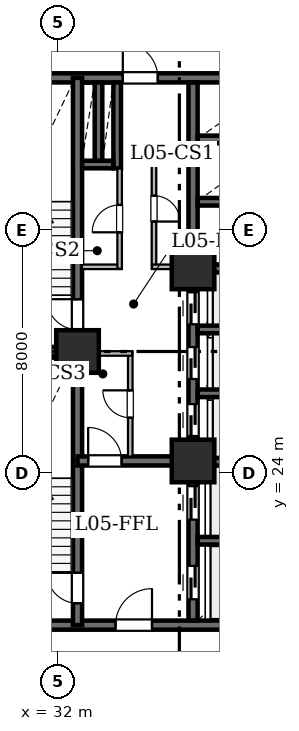
"""IFC4 building model, lengths in metres.
Left out: names, types, materials, properties, quantities, classifications, styles, units other than length and angle.
Written with IfcOpenShell. Run it as: python <this file> out.ifc"""

import sys

from ifc_helpers import new_model, si_unit, direction, frame, frame_2d, origin, origin_2d, place, context, subcontext, project, spatial, rectangle, hollow_rectangle, extrude, element, fill, save


model = new_model("IFC4")
c1 = context("Model", 3, precision=1e-05, world=origin(), true_north=direction((0.0, 1.0)))
c2 = subcontext(c1, "Body", "Model", "MODEL_VIEW")
j1 = project(units=[si_unit("LENGTHUNIT", "METRE"), si_unit("PLANEANGLEUNIT", "RADIAN")], contexts=[c1])
p1 = place(None, origin())
s1 = spatial("IfcSite", under=j1, at=p1, CompositionType="ELEMENT")
p2 = place(p1, origin())
s2 = spatial("IfcBuilding", under=s1, at=p2, CompositionType="ELEMENT")
p3 = place(p2, frame((0.0, 0.0, 24.6)))
s3 = spatial("IfcBuildingStorey", under=s2, at=p3, CompositionType="ELEMENT", Elevation=24.6)
for number, where, z_axis, x_axis in (
    (1, (32.65, 28.0, 0.0), (0.0, 0.0, 1.0), (1.0, 0.0, 0.0)),
    (2, (36.45, 24.4, 0.0), (0.0, 0.0, 1.0), (1.0, 0.0, 0.0)),
    (3, (36.45, 30.75, 0.0), (0.0, 0.0, 1.0), (1.0, 0.0, 0.0)),
):
    element("IfcColumn", number, at=place(p3, frame(where, z_axis=z_axis, x_axis=x_axis)), inside=s3, PredefinedType="COLUMN", context=c2, shape_type="SweptSolid", body=[
        extrude(hollow_rectangle(XDim=1.4, YDim=1.4, WallThickness=0.07, at=origin_2d()), origin(), (0.0, 0.0, 1.0), 4.2),
    ])
p4 = place(p3, frame((29.0, 19.0, 0.0), z_axis=(0.0, 0.0, 1.0), x_axis=(1.0, 0.0, 0.0)))
e4 = element("IfcWall", 4, at=p4, inside=s3, PredefinedType="SHEAR", context=c2, shape_type="SweptSolid", body=[
    extrude(rectangle(XDim=10.4, YDim=0.3, at=frame_2d((5.2, 0.0))), origin(), (0.0, 0.0, 1.0), 3.92),
])
p5 = place(p4, frame((4.9, 0.0, 0.0)))
e5 = element("IfcOpeningElement", 5, at=p5, cuts=e4, PredefinedType="OPENING", context=c2, shape_type="SweptSolid", body=[
    extrude(rectangle(XDim=1.2, YDim=2.15, at=frame_2d((0.6, 1.075))), frame((0.0, 0.16, 0.0), z_axis=(0.0, -1.0, 0.0), x_axis=(1.0, 0.0, 0.0)), (0.0, 0.0, 1.0), 0.32),
])
p6 = place(p3, frame((29.0, 37.0, 0.0), z_axis=(0.0, 0.0, 1.0), x_axis=(1.0, 0.0, 0.0)))
e6 = element("IfcWall", 6, at=p6, inside=s3, PredefinedType="SHEAR", context=c2, shape_type="SweptSolid", body=[
    extrude(rectangle(XDim=10.4, YDim=0.3, at=frame_2d((5.2, 0.0))), origin(), (0.0, 0.0, 1.0), 3.92),
])
p7 = place(p6, frame((5.14, 0.0, 0.0)))
e7 = element("IfcOpeningElement", 7, at=p7, cuts=e6, PredefinedType="OPENING", context=c2, shape_type="SweptSolid", body=[
    extrude(rectangle(XDim=1.15, YDim=2.2, at=frame_2d((0.575, 1.1))), frame((0.0, 0.16, 0.0), z_axis=(0.0, -1.0, 0.0), x_axis=(1.0, 0.0, 0.0)), (0.0, 0.0, 1.0), 0.32),
])
p8 = place(p3, frame((32.65, 19.0, 0.0), z_axis=(0.0, 0.0, 1.0), x_axis=(0.0, 1.0, 0.0)))
e8 = element("IfcWall", 8, at=p8, inside=s3, PredefinedType="SHEAR", context=c2, shape_type="SweptSolid", body=[
    extrude(rectangle(XDim=9.0, YDim=0.3, at=frame_2d((4.5, 0.0))), origin(), (0.0, 0.0, 1.0), 3.92),
])
p9 = place(p8, frame((0.72, 0.0, 0.0)))
e9 = element("IfcOpeningElement", 9, at=p9, cuts=e8, PredefinedType="OPENING", context=c2, shape_type="SweptSolid", body=[
    extrude(rectangle(XDim=1.0, YDim=2.15, at=frame_2d((0.5, 1.075))), frame((0.0, 0.16, 0.0), z_axis=(0.0, -1.0, 0.0), x_axis=(1.0, 0.0, 0.0)), (0.0, 0.0, 1.0), 0.32),
])
p10 = place(p3, frame((32.65, 28.0, 0.0), z_axis=(0.0, 0.0, 1.0), x_axis=(0.0, 1.0, 0.0)))
e10 = element("IfcWall", 10, at=p10, inside=s3, PredefinedType="SHEAR", context=c2, shape_type="SweptSolid", body=[
    extrude(rectangle(XDim=9.0, YDim=0.3, at=frame_2d((4.5, 0.0))), origin(), (0.0, 0.0, 1.0), 3.92),
])
p11 = place(p10, frame((0.72, 0.0, 0.0)))
e11 = element("IfcOpeningElement", 11, at=p11, cuts=e10, PredefinedType="OPENING", context=c2, shape_type="SweptSolid", body=[
    extrude(rectangle(XDim=1.0, YDim=2.15, at=frame_2d((0.5, 1.075))), frame((0.0, 0.16, 0.0), z_axis=(0.0, -1.0, 0.0), x_axis=(1.0, 0.0, 0.0)), (0.0, 0.0, 1.0), 0.32),
])
p12 = place(p3, frame((29.0, 28.0, 0.0), z_axis=(0.0, 0.0, 1.0), x_axis=(1.0, 0.0, 0.0)))
e12 = element("IfcWall", 12, at=p12, inside=s3, PredefinedType="SHEAR", context=c2, shape_type="SweptSolid", body=[
    extrude(rectangle(XDim=3.65, YDim=0.3, at=frame_2d((1.825, 0.0))), origin(), (0.0, 0.0, 1.0), 3.92),
])
p13 = place(p3, frame((32.65, 24.4, 0.0), z_axis=(0.0, 0.0, 1.0), x_axis=(1.0, 0.0, 0.0)))
e13 = element("IfcWall", 13, at=p13, inside=s3, PredefinedType="SHEAR", context=c2, shape_type="SweptSolid", body=[
    extrude(rectangle(XDim=3.8, YDim=0.3, at=frame_2d((1.9, 0.0))), origin(), (0.0, 0.0, 1.0), 3.92),
])
p14 = place(p13, frame((0.35, 0.0, 0.0)))
e14 = element("IfcOpeningElement", 14, at=p14, cuts=e13, PredefinedType="OPENING", context=c2, shape_type="SweptSolid", body=[
    extrude(rectangle(XDim=1.1, YDim=2.15, at=frame_2d((0.55, 1.075))), frame((0.0, 0.16, 0.0), z_axis=(0.0, -1.0, 0.0), x_axis=(1.0, 0.0, 0.0)), (0.0, 0.0, 1.0), 0.32),
])
p15 = place(p3, frame((36.45, 19.154, 0.0), z_axis=(0.0, 0.0, 1.0), x_axis=(0.0, 1.0, 0.0)))
e15 = element("IfcWall", 15, at=p15, inside=s3, PredefinedType="SHEAR", context=c2, shape_type="SweptSolid", body=[
    extrude(rectangle(XDim=4.546, YDim=0.3, at=frame_2d((2.273, 0.0))), origin(), (0.0, 0.0, 1.0), 3.92),
])
p16 = place(p15, frame((0.696, 0.0, 0.0)))
e16 = element("IfcOpeningElement", 16, at=p16, cuts=e15, PredefinedType="OPENING", context=c2, shape_type="SweptSolid", body=[
    extrude(rectangle(XDim=1.1, YDim=2.15, at=frame_2d((0.55, 1.075))), frame((0.0, 0.16, 0.0), z_axis=(0.0, -1.0, 0.0), x_axis=(1.0, 0.0, 0.0)), (0.0, 0.0, 1.0), 0.32),
])
p17 = place(p15, frame((3.316, 0.0, 0.0)))
e17 = element("IfcOpeningElement", 17, at=p17, cuts=e15, PredefinedType="OPENING", context=c2, shape_type="SweptSolid", body=[
    extrude(rectangle(XDim=1.1, YDim=2.15, at=frame_2d((0.55, 1.075))), frame((0.0, 0.16, 0.0), z_axis=(0.0, -1.0, 0.0), x_axis=(1.0, 0.0, 0.0)), (0.0, 0.0, 1.0), 0.32),
])
p18 = place(p3, frame((36.45, 25.1, 0.0), z_axis=(0.0, 0.0, 1.0), x_axis=(0.0, 1.0, 0.0)))
e18 = element("IfcWall", 18, at=p18, inside=s3, PredefinedType="SHEAR", context=c2, shape_type="SweptSolid", body=[
    extrude(rectangle(XDim=4.95, YDim=0.3, at=frame_2d((2.475, 0.0))), origin(), (0.0, 0.0, 1.0), 3.92),
])
p19 = place(p18, frame((0.12, 0.0, 0.0)))
e19 = element("IfcOpeningElement", 19, at=p19, cuts=e18, PredefinedType="OPENING", context=c2, shape_type="SweptSolid", body=[
    extrude(rectangle(XDim=1.05, YDim=2.15, at=frame_2d((0.525, 1.075))), frame((0.0, 0.16, 0.0), z_axis=(0.0, -1.0, 0.0), x_axis=(1.0, 0.0, 0.0)), (0.0, 0.0, 1.0), 0.32),
])
p20 = place(p18, frame((1.995, 0.0, 0.0)))
e20 = element("IfcOpeningElement", 20, at=p20, cuts=e18, PredefinedType="OPENING", context=c2, shape_type="SweptSolid", body=[
    extrude(rectangle(XDim=1.05, YDim=2.15, at=frame_2d((0.525, 1.075))), frame((0.0, 0.16, 0.0), z_axis=(0.0, -1.0, 0.0), x_axis=(1.0, 0.0, 0.0)), (0.0, 0.0, 1.0), 0.32),
])
p21 = place(p18, frame((3.795, 0.0, 0.0)))
e21 = element("IfcOpeningElement", 21, at=p21, cuts=e18, PredefinedType="OPENING", context=c2, shape_type="SweptSolid", body=[
    extrude(rectangle(XDim=1.05, YDim=2.15, at=frame_2d((0.525, 1.075))), frame((0.0, 0.16, 0.0), z_axis=(0.0, -1.0, 0.0), x_axis=(1.0, 0.0, 0.0)), (0.0, 0.0, 1.0), 0.32),
])
p22 = place(p3, frame((36.45, 31.45, 0.0), z_axis=(0.0, 0.0, 1.0), x_axis=(0.0, 1.0, 0.0)))
e22 = element("IfcWall", 22, at=p22, inside=s3, PredefinedType="SHEAR", context=c2, shape_type="SweptSolid", body=[
    extrude(rectangle(XDim=5.396, YDim=0.3, at=frame_2d((2.698, 0.0))), origin(), (0.0, 0.0, 1.0), 3.92),
])
for number, where, z_axis, x_axis in (
    (23, (36.604, 21.775, 0.0), (0.0, 0.0, 1.0), (1.0, 0.0, 0.0)),
    (24, (36.604, 24.375, 0.0), (0.0, 0.0, 1.0), (1.0, 0.0, 0.0)),
    (25, (36.604, 26.625, 0.0), (0.0, 0.0, 1.0), (1.0, 0.0, 0.0)),
    (26, (36.604, 28.725, 0.0), (0.0, 0.0, 1.0), (1.0, 0.0, 0.0)),
    (27, (36.604, 30.725, 0.0), (0.0, 0.0, 1.0), (1.0, 0.0, 0.0)),
    (28, (36.604, 32.925, 0.0), (0.0, 0.0, 1.0), (1.0, 0.0, 0.0)),
    (29, (36.604, 34.975, 0.0), (0.0, 0.0, 1.0), (1.0, 0.0, 0.0)),
):
    element("IfcWall", number, at=place(p3, frame(where, z_axis=z_axis, x_axis=x_axis)), inside=s3, PredefinedType="SHEAR", context=c2, shape_type="SweptSolid", body=[
        extrude(rectangle(XDim=2.642, YDim=0.25, at=frame_2d((1.321, 0.0))), origin(), (0.0, 0.0, 1.0), 3.92),
    ])
p23 = place(p3, frame((33.955, 34.025, 0.0), z_axis=(0.0, 0.0, 1.0), x_axis=(0.0, 1.0, 0.0)))
e30 = element("IfcWall", 30, at=p23, inside=s3, PredefinedType="SHEAR", context=c2, shape_type="SweptSolid", body=[
    extrude(rectangle(XDim=2.821, YDim=0.25, at=frame_2d((1.411, 0.0))), origin(), (0.0, 0.0, 1.0), 3.92),
])
p24 = place(p3, frame((32.804, 34.15, 0.0), z_axis=(0.0, 0.0, 1.0), x_axis=(1.0, 0.0, 0.0)))
e31 = element("IfcWall", 31, at=p24, inside=s3, PredefinedType="SHEAR", context=c2, shape_type="SweptSolid", body=[
    extrude(rectangle(XDim=1.022, YDim=0.25, at=frame_2d((0.511, 0.0))), origin(), (0.0, 0.0, 1.0), 3.92),
])
p25 = place(p3, frame((33.34, 34.279, 0.0), z_axis=(0.0, 0.0, 1.0), x_axis=(0.0, 1.0, 0.0)))
e32 = element("IfcWall", 32, at=p25, inside=s3, PredefinedType="SHEAR", context=c2, shape_type="SweptSolid", body=[
    extrude(rectangle(XDim=2.567, YDim=0.25, at=frame_2d((1.283, 0.0))), origin(), (0.0, 0.0, 1.0), 3.92),
])
p26 = place(p3, frame((36.306, 34.615, 0.0), z_axis=(0.0, 0.0, 1.0), x_axis=(-1.0, 0.0, 0.0)))
e33 = element("IfcWall", 33, at=p26, inside=s3, PredefinedType="STANDARD", context=c2, shape_type="SweptSolid", body=[
    extrude(rectangle(XDim=1.206, YDim=0.15, at=frame_2d((0.603, 0.0))), origin(), (0.0, 0.0, 1.0), 3.92),
])
p27 = place(p3, frame((35.165, 34.678, 0.0), z_axis=(0.0, 0.0, 1.0), x_axis=(0.0, -1.0, 0.0)))
e34 = element("IfcWall", 34, at=p27, inside=s3, PredefinedType="STANDARD", context=c2, shape_type="SweptSolid", body=[
    extrude(rectangle(XDim=3.958, YDim=0.15, at=frame_2d((1.979, 0.0))), origin(), (0.0, 0.0, 1.0), 3.92),
])
p28 = place(p27, frame((1.554, 0.0, 0.0)))
e35 = element("IfcOpeningElement", 35, at=p28, cuts=e34, PredefinedType="OPENING", context=c2, shape_type="SweptSolid", body=[
    extrude(rectangle(XDim=0.85, YDim=2.1, at=frame_2d((0.425, 1.05))), frame((0.0, 0.085, 0.0), z_axis=(0.0, -1.0, 0.0), x_axis=(1.0, 0.0, 0.0)), (0.0, 0.0, 1.0), 0.17),
])
p29 = place(p3, frame((35.102, 30.785, 0.0), z_axis=(0.0, 0.0, 1.0), x_axis=(1.0, 0.0, 0.0)))
e36 = element("IfcWall", 36, at=p29, inside=s3, PredefinedType="STANDARD", context=c2, shape_type="SweptSolid", body=[
    extrude(rectangle(XDim=1.198, YDim=0.15, at=frame_2d((0.599, 0.0))), origin(), (0.0, 0.0, 1.0), 3.92),
])
p30 = place(p3, frame((32.794, 30.785, 0.0), z_axis=(0.0, 0.0, 1.0), x_axis=(1.0, 0.0, 0.0)))
e37 = element("IfcWall", 37, at=p30, inside=s3, PredefinedType="STANDARD", context=c2, shape_type="SweptSolid", body=[
    extrude(rectangle(XDim=1.306, YDim=0.15, at=frame_2d((0.653, 0.0))), origin(), (0.0, 0.0, 1.0), 3.377),
])
p31 = place(p3, frame((34.035, 30.72, 0.0), z_axis=(0.0, 0.0, 1.0), x_axis=(0.0, 1.0, 0.0)))
e38 = element("IfcWall", 38, at=p31, inside=s3, PredefinedType="STANDARD", context=c2, shape_type="SweptSolid", body=[
    extrude(rectangle(XDim=3.3, YDim=0.15, at=frame_2d((1.65, 0.0))), origin(), (0.0, 0.0, 1.0), 3.92),
])
p32 = place(p31, frame((1.2, 0.0, 0.0)))
e39 = element("IfcOpeningElement", 39, at=p32, cuts=e38, PredefinedType="OPENING", context=c2, shape_type="SweptSolid", body=[
    extrude(rectangle(XDim=0.9, YDim=2.1, at=frame_2d((0.45, 1.05))), frame((0.0, 0.085, 0.0), z_axis=(0.0, -1.0, 0.0), x_axis=(1.0, 0.0, 0.0)), (0.0, 0.0, 1.0), 0.17),
])
p33 = place(p3, frame((34.385, 24.544, 0.0), z_axis=(0.0, 0.0, 1.0), x_axis=(0.0, 1.0, 0.0)))
e40 = element("IfcWall", 40, at=p33, inside=s3, PredefinedType="STANDARD", context=c2, shape_type="SweptSolid", body=[
    extrude(rectangle(XDim=3.456, YDim=0.15, at=frame_2d((1.728, 0.0))), origin(), (0.0, 0.0, 1.0), 3.92),
])
p34 = place(p33, frame((1.278, 0.0, 0.0)))
e41 = element("IfcOpeningElement", 41, at=p34, cuts=e40, PredefinedType="OPENING", context=c2, shape_type="SweptSolid", body=[
    extrude(rectangle(XDim=0.9, YDim=2.1, at=frame_2d((0.45, 1.05))), frame((0.0, 0.085, 0.0), z_axis=(0.0, -1.0, 0.0), x_axis=(1.0, 0.0, 0.0)), (0.0, 0.0, 1.0), 0.17),
])
p35 = place(p3, frame((34.45, 27.935, 0.0), z_axis=(0.0, 0.0, 1.0), x_axis=(-1.0, 0.0, 0.0)))
e42 = element("IfcWall", 42, at=p35, inside=s3, PredefinedType="STANDARD", context=c2, shape_type="SweptSolid", body=[
    extrude(rectangle(XDim=1.656, YDim=0.15, at=frame_2d((0.828, 0.0))), origin(), (0.0, 0.0, 1.0), 3.377),
])
p36 = place(p9, origin())
e43 = element("IfcDoor", 43, at=p36, inside=s3, OperationType="SINGLE_SWING_RIGHT", PredefinedType="DOOR", context=c2, shape_type="SweptSolid", body=[
    extrude(rectangle(XDim=1.0, YDim=2.15, at=frame_2d((0.5, 1.075))), frame((0.0, 0.025, 0.0), z_axis=(0.0, -1.0, 0.0), x_axis=(1.0, 0.0, 0.0)), (0.0, 0.0, 1.0), 0.05),
])
fill(e9, e43)
p37 = place(p11, origin())
e44 = element("IfcDoor", 44, at=p37, inside=s3, OperationType="SINGLE_SWING_RIGHT", PredefinedType="DOOR", context=c2, shape_type="SweptSolid", body=[
    extrude(rectangle(XDim=1.0, YDim=2.15, at=frame_2d((0.5, 1.075))), frame((0.0, 0.025, 0.0), z_axis=(0.0, -1.0, 0.0), x_axis=(1.0, 0.0, 0.0)), (0.0, 0.0, 1.0), 0.05),
])
fill(e11, e44)
p38 = place(p14, origin())
e45 = element("IfcDoor", 45, at=p38, inside=s3, OperationType="SINGLE_SWING_LEFT", PredefinedType="DOOR", context=c2, shape_type="SweptSolid", body=[
    extrude(rectangle(XDim=1.1, YDim=2.15, at=frame_2d((0.55, 1.075))), frame((0.0, 0.025, 0.0), z_axis=(0.0, -1.0, 0.0), x_axis=(1.0, 0.0, 0.0)), (0.0, 0.0, 1.0), 0.05),
])
fill(e14, e45)
p39 = place(p5, origin())
e46 = element("IfcDoor", 46, at=p39, inside=s3, OperationType="SINGLE_SWING_RIGHT", PredefinedType="DOOR", context=c2, shape_type="SweptSolid", body=[
    extrude(rectangle(XDim=1.2, YDim=2.15, at=frame_2d((0.6, 1.075))), frame((0.0, 0.025, 0.0), z_axis=(0.0, -1.0, 0.0), x_axis=(1.0, 0.0, 0.0)), (0.0, 0.0, 1.0), 0.05),
])
fill(e5, e46)
p40 = place(p7, origin())
e47 = element("IfcDoor", 47, at=p40, inside=s3, OperationType="SINGLE_SWING_LEFT", PredefinedType="DOOR", context=c2, shape_type="SweptSolid", body=[
    extrude(rectangle(XDim=1.15, YDim=2.2, at=frame_2d((0.575, 1.1))), frame((0.0, 0.025, 0.0), z_axis=(0.0, -1.0, 0.0), x_axis=(1.0, 0.0, 0.0)), (0.0, 0.0, 1.0), 0.05),
])
fill(e7, e47)
p41 = place(p16, origin())
e48 = element("IfcDoor", 48, at=p41, inside=s3, OperationType="SLIDING_TO_LEFT", PredefinedType="DOOR", context=c2, shape_type="SweptSolid", body=[
    extrude(rectangle(XDim=1.1, YDim=2.15, at=frame_2d((0.55, 1.075))), frame((0.0, 0.025, 0.0), z_axis=(0.0, -1.0, 0.0), x_axis=(1.0, 0.0, 0.0)), (0.0, 0.0, 1.0), 0.05),
])
fill(e16, e48)
p42 = place(p17, origin())
e49 = element("IfcDoor", 49, at=p42, inside=s3, OperationType="SLIDING_TO_LEFT", PredefinedType="DOOR", context=c2, shape_type="SweptSolid", body=[
    extrude(rectangle(XDim=1.1, YDim=2.15, at=frame_2d((0.55, 1.075))), frame((0.0, 0.025, 0.0), z_axis=(0.0, -1.0, 0.0), x_axis=(1.0, 0.0, 0.0)), (0.0, 0.0, 1.0), 0.05),
])
fill(e17, e49)
p43 = place(p19, origin())
e50 = element("IfcDoor", 50, at=p43, inside=s3, OperationType="SLIDING_TO_LEFT", PredefinedType="DOOR", context=c2, shape_type="SweptSolid", body=[
    extrude(rectangle(XDim=1.05, YDim=2.15, at=frame_2d((0.525, 1.075))), frame((0.0, 0.025, 0.0), z_axis=(0.0, -1.0, 0.0), x_axis=(1.0, 0.0, 0.0)), (0.0, 0.0, 1.0), 0.05),
])
fill(e19, e50)
p44 = place(p20, origin())
e51 = element("IfcDoor", 51, at=p44, inside=s3, OperationType="SLIDING_TO_LEFT", PredefinedType="DOOR", context=c2, shape_type="SweptSolid", body=[
    extrude(rectangle(XDim=1.05, YDim=2.15, at=frame_2d((0.525, 1.075))), frame((0.0, 0.025, 0.0), z_axis=(0.0, -1.0, 0.0), x_axis=(1.0, 0.0, 0.0)), (0.0, 0.0, 1.0), 0.05),
])
fill(e20, e51)
p45 = place(p21, origin())
e52 = element("IfcDoor", 52, at=p45, inside=s3, OperationType="SLIDING_TO_LEFT", PredefinedType="DOOR", context=c2, shape_type="SweptSolid", body=[
    extrude(rectangle(XDim=1.05, YDim=2.15, at=frame_2d((0.525, 1.075))), frame((0.0, 0.025, 0.0), z_axis=(0.0, -1.0, 0.0), x_axis=(1.0, 0.0, 0.0)), (0.0, 0.0, 1.0), 0.05),
])
fill(e21, e52)
p46 = place(p28, origin())
e53 = element("IfcDoor", 53, at=p46, inside=s3, OperationType="SINGLE_SWING_RIGHT", PredefinedType="DOOR", context=c2, shape_type="SweptSolid", body=[
    extrude(rectangle(XDim=0.85, YDim=2.1, at=frame_2d((0.425, 1.05))), frame((0.0, 0.025, 0.0), z_axis=(0.0, -1.0, 0.0), x_axis=(1.0, 0.0, 0.0)), (0.0, 0.0, 1.0), 0.05),
])
fill(e35, e53)
p47 = place(p32, origin())
e54 = element("IfcDoor", 54, at=p47, inside=s3, OperationType="SINGLE_SWING_LEFT", PredefinedType="DOOR", context=c2, shape_type="SweptSolid", body=[
    extrude(rectangle(XDim=0.9, YDim=2.1, at=frame_2d((0.45, 1.05))), frame((0.0, 0.025, 0.0), z_axis=(0.0, -1.0, 0.0), x_axis=(1.0, 0.0, 0.0)), (0.0, 0.0, 1.0), 0.05),
])
fill(e39, e54)
p48 = place(p34, origin())
e55 = element("IfcDoor", 55, at=p48, inside=s3, OperationType="SINGLE_SWING_RIGHT", PredefinedType="DOOR", context=c2, shape_type="SweptSolid", body=[
    extrude(rectangle(XDim=0.9, YDim=2.1, at=frame_2d((0.45, 1.05))), frame((0.0, 0.025, 0.0), z_axis=(0.0, -1.0, 0.0), x_axis=(1.0, 0.0, 0.0)), (0.0, 0.0, 1.0), 0.05),
])
fill(e41, e55)
save(model, sys.argv[1])
